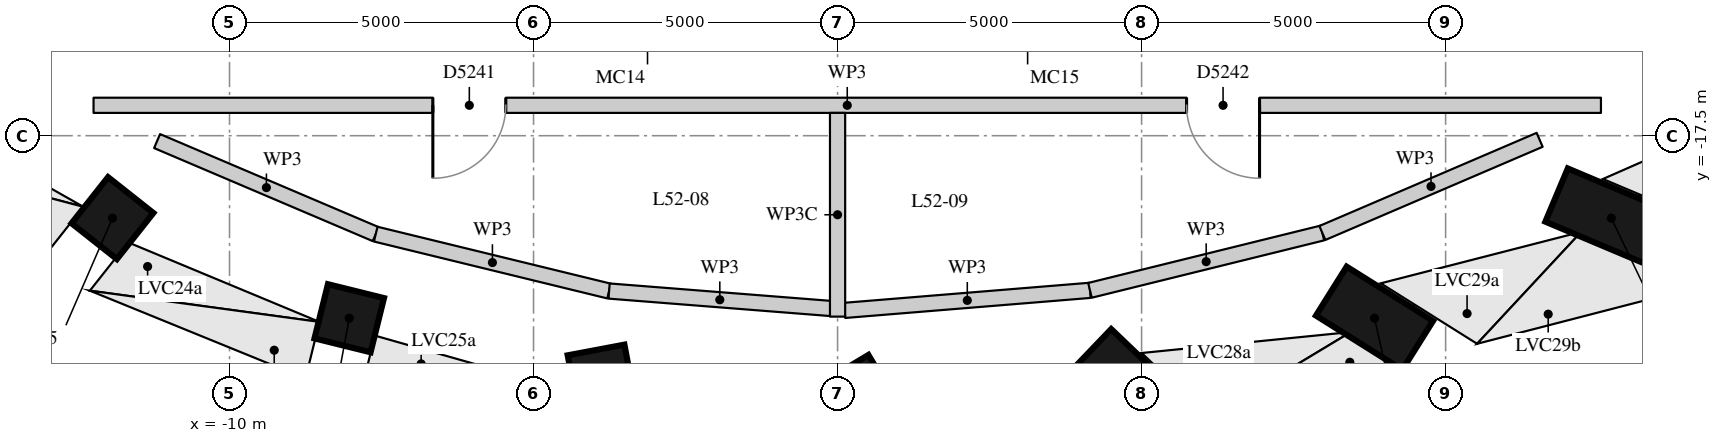
"""IFC4 building model, lengths in metres.
Left out: names, types, materials, properties, quantities, classifications, styles, units other than length and angle.
Written with IfcOpenShell. Run it as: python <this file> out.ifc"""

import sys

from ifc_helpers import new_model, si_unit, direction, frame, frame_2d, origin, origin_2d, place, context, subcontext, project, spatial, rectangle, extrude, element, fill, save


model = new_model("IFC4")
c1 = context("Model", 3, precision=1e-05, world=origin(), true_north=direction((0.0, 1.0)))
c2 = subcontext(c1, "Body", "Model", "MODEL_VIEW")
j1 = project(units=[si_unit("LENGTHUNIT", "METRE"), si_unit("PLANEANGLEUNIT", "RADIAN")], contexts=[c1])
p1 = place(None, origin())
s1 = spatial("IfcSite", under=j1, at=p1, CompositionType="ELEMENT")
p2 = place(p1, origin())
s2 = spatial("IfcBuilding", under=s1, at=p2, CompositionType="ELEMENT")
p3 = place(p2, frame((0.0, 0.0, 184.7)))
s3 = spatial("IfcBuildingStorey", under=s2, at=p3, CompositionType="ELEMENT", Elevation=184.7)
p4 = place(p3, frame((-11.625, -18.476, 0.17), z_axis=(-0.140500038504, -0.177654239085, 0.974011658306), x_axis=(0.604194068875, 0.763968741279, 0.226497879647)))
e1 = element("IfcColumn", 1, at=p4, inside=s3, PredefinedType="COLUMN", context=c2, shape_type="SweptSolid", body=[
    extrude(rectangle(XDim=1.5, YDim=0.95, at=origin_2d()), origin(), (0.0, 0.0, 1.0), 4.271),
])
p5 = place(p3, frame((-7.92, -20.056, 0.161), z_axis=(-0.051593855081, -0.208372970022, 0.976687657075), x_axis=(0.234742481958, 0.948058408879, 0.214665368697)))
e2 = element("IfcColumn", 2, at=p5, inside=s3, PredefinedType="COLUMN", context=c2, shape_type="SweptSolid", body=[
    extrude(rectangle(XDim=1.5, YDim=0.95, at=origin_2d()), origin(), (0.0, 0.0, 1.0), 4.278),
])
p6 = place(p3, frame((-3.972, -21.024, 0.174), z_axis=(0.042954678176, -0.227871421909, 0.972743291265), x_axis=(-0.180192503678, 0.955908035492, 0.231884646537)))
e3 = element("IfcColumn", 3, at=p6, inside=s3, PredefinedType="COLUMN", context=c2, shape_type="SweptSolid", body=[
    extrude(rectangle(XDim=1.5, YDim=0.95, at=origin_2d()), origin(), (0.0, 0.0, 1.0), 4.269),
])
p7 = place(p3, frame((0.1, -21.35, 0.206), z_axis=(0.141086702046, -0.235201925755, 0.96165201431), x_axis=(-0.494677052972, 0.824663088716, 0.27427249839)))
e4 = element("IfcColumn", 4, at=p7, inside=s3, PredefinedType="COLUMN", context=c2, shape_type="SweptSolid", body=[
    extrude(rectangle(XDim=1.5, YDim=0.95, at=origin_2d()), origin(), (0.0, 0.0, 1.0), 4.252),
])
p8 = place(p3, frame((4.172, -21.024, 0.249), z_axis=(0.239621435713, -0.229263160394, 0.943408697666), x_axis=(-0.681661281299, 0.652194655306, 0.331632370506)))
e5 = element("IfcColumn", 5, at=p8, inside=s3, PredefinedType="COLUMN", context=c2, shape_type="SweptSolid", body=[
    extrude(rectangle(XDim=1.5, YDim=0.95, at=origin_2d()), origin(), (0.0, 0.0, 1.0), 4.242),
])
p9 = place(p3, frame((8.12, -20.056, 0.296), z_axis=(0.334080086982, -0.209574982401, 0.918949847507), x_axis=(-0.778455281915, 0.488340246439, 0.394374413174)))
e6 = element("IfcColumn", 6, at=p9, inside=s3, PredefinedType="COLUMN", context=c2, shape_type="SweptSolid", body=[
    extrude(rectangle(XDim=1.5, YDim=0.95, at=origin_2d()), origin(), (0.0, 0.0, 1.0), 4.253),
])
p10 = place(p3, frame((11.825, -18.476, 0.342), z_axis=(0.419835312824, -0.17697655666, 0.890178413858), x_axis=(-0.820277441268, 0.345778148306, 0.455612106403)))
e7 = element("IfcColumn", 7, at=p10, inside=s3, PredefinedType="COLUMN", context=c2, shape_type="SweptSolid", body=[
    extrude(rectangle(XDim=1.5, YDim=0.95, at=origin_2d()), origin(), (0.0, 0.0, 1.0), 4.288),
])
p11 = place(p3, frame((-11.191, -17.588, 0.0), z_axis=(0.0, 0.0, 1.0), x_axis=(0.92013404358, -0.391603551881, 0.0)))
e8 = element("IfcWall", 8, at=p11, inside=s3, PredefinedType="PARTITIONING", context=c2, shape_type="SweptSolid", body=[
    extrude(rectangle(XDim=3.908, YDim=0.25, at=frame_2d((1.954, 0.0))), origin(), (0.0, 0.0, 1.0), 4.22),
])
p12 = place(p3, frame((-7.595, -19.119, 0.0), z_axis=(0.0, 0.0, 1.0), x_axis=(0.971533177519, -0.236903535176, 0.0)))
e9 = element("IfcWall", 9, at=p12, inside=s3, PredefinedType="PARTITIONING", context=c2, shape_type="SweptSolid", body=[
    extrude(rectangle(XDim=3.95, YDim=0.25, at=frame_2d((1.975, 0.0))), origin(), (0.0, 0.0, 1.0), 4.22),
])
p13 = place(p3, frame((-3.758, -20.055, 0.0), z_axis=(0.0, 0.0, 1.0), x_axis=(0.996917299027, -0.078459536707, 0.0)))
e10 = element("IfcWall", 10, at=p13, inside=s3, PredefinedType="PARTITIONING", context=c2, shape_type="SweptSolid", body=[
    extrude(rectangle(XDim=3.653, YDim=0.25, at=frame_2d((1.827, 0.0))), origin(), (0.0, 0.0, 1.0), 4.22),
])
p14 = place(p3, frame((0.116, -20.373, 0.0), z_axis=(0.0, 0.0, 1.0), x_axis=(0.996675927818, 0.081468367527, 0.0)))
e11 = element("IfcWall", 11, at=p14, inside=s3, PredefinedType="PARTITIONING", context=c2, shape_type="SweptSolid", body=[
    extrude(rectangle(XDim=4.049, YDim=0.25, at=frame_2d((2.024, 0.0))), origin(), (0.0, 0.0, 1.0), 4.22),
])
p15 = place(p3, frame((4.151, -20.043, 0.0), z_axis=(0.0, 0.0, 1.0), x_axis=(0.970864109011, 0.23963071972, 0.0)))
e12 = element("IfcWall", 12, at=p15, inside=s3, PredefinedType="PARTITIONING", context=c2, shape_type="SweptSolid", body=[
    extrude(rectangle(XDim=3.937, YDim=0.25, at=frame_2d((1.968, 0.0))), origin(), (0.0, 0.0, 1.0), 4.22),
])
p16 = place(p3, frame((7.973, -19.1, 0.0), z_axis=(0.0, 0.0, 1.0), x_axis=(0.919076811857, 0.394078436238, 0.0)))
e13 = element("IfcWall", 13, at=p16, inside=s3, PredefinedType="PARTITIONING", context=c2, shape_type="SweptSolid", body=[
    extrude(rectangle(XDim=3.888, YDim=0.25, at=frame_2d((1.944, 0.0))), origin(), (0.0, 0.0, 1.0), 4.22),
])
p17 = place(p3, frame((-12.236, -17.0, 0.0), z_axis=(0.0, 0.0, 1.0), x_axis=(1.0, 0.0, 0.0)))
e14 = element("IfcWall", 14, at=p17, inside=s3, PredefinedType="PARTITIONING", context=c2, shape_type="SweptSolid", body=[
    extrude(rectangle(XDim=24.791, YDim=0.25, at=frame_2d((12.396, 0.0))), origin(), (0.0, 0.0, 1.0), 4.22),
])
p18 = place(p17, frame((5.58, 0.0, 0.0)))
e15 = element("IfcOpeningElement", 15, at=p18, cuts=e14, PredefinedType="OPENING", context=c2, shape_type="SweptSolid", body=[
    extrude(rectangle(XDim=1.2, YDim=2.1, at=frame_2d((0.6, 1.05))), frame((0.0, 0.135, 0.0), z_axis=(0.0, -1.0, 0.0), x_axis=(1.0, 0.0, 0.0)), (0.0, 0.0, 1.0), 0.27),
])
p19 = place(p17, frame((17.976, 0.0, 0.0)))
e16 = element("IfcOpeningElement", 16, at=p19, cuts=e14, PredefinedType="OPENING", context=c2, shape_type="SweptSolid", body=[
    extrude(rectangle(XDim=1.2, YDim=2.1, at=frame_2d((0.6, 1.05))), frame((0.0, 0.135, 0.0), z_axis=(0.0, -1.0, 0.0), x_axis=(1.0, 0.0, 0.0)), (0.0, 0.0, 1.0), 0.27),
])
p20 = place(p3, frame((0.0, -20.476, 0.0), z_axis=(0.0, 0.0, 1.0), x_axis=(0.0, 1.0, 0.0)))
e17 = element("IfcWall", 17, at=p20, inside=s3, PredefinedType="PARTITIONING", context=c2, shape_type="SweptSolid", body=[
    extrude(rectangle(XDim=3.351, YDim=0.25, at=frame_2d((1.675, 0.0))), origin(), (0.0, 0.0, 1.0), 3.77),
])
p21 = place(p18, origin())
e18 = element("IfcDoor", 18, at=p21, inside=s3, OperationType="SINGLE_SWING_RIGHT", PredefinedType="DOOR", context=c2, shape_type="SweptSolid", body=[
    extrude(rectangle(XDim=1.2, YDim=2.1, at=frame_2d((0.6, 1.05))), frame((0.0, 0.025, 0.0), z_axis=(0.0, -1.0, 0.0), x_axis=(1.0, 0.0, 0.0)), (0.0, 0.0, 1.0), 0.05),
])
fill(e15, e18)
p22 = place(p19, origin())
e19 = element("IfcDoor", 19, at=p22, inside=s3, OperationType="SINGLE_SWING_LEFT", PredefinedType="DOOR", context=c2, shape_type="SweptSolid", body=[
    extrude(rectangle(XDim=1.2, YDim=2.1, at=frame_2d((0.6, 1.05))), frame((0.0, 0.025, 0.0), z_axis=(0.0, -1.0, 0.0), x_axis=(1.0, 0.0, 0.0)), (0.0, 0.0, 1.0), 0.05),
])
fill(e16, e19)
save(model, sys.argv[1])
